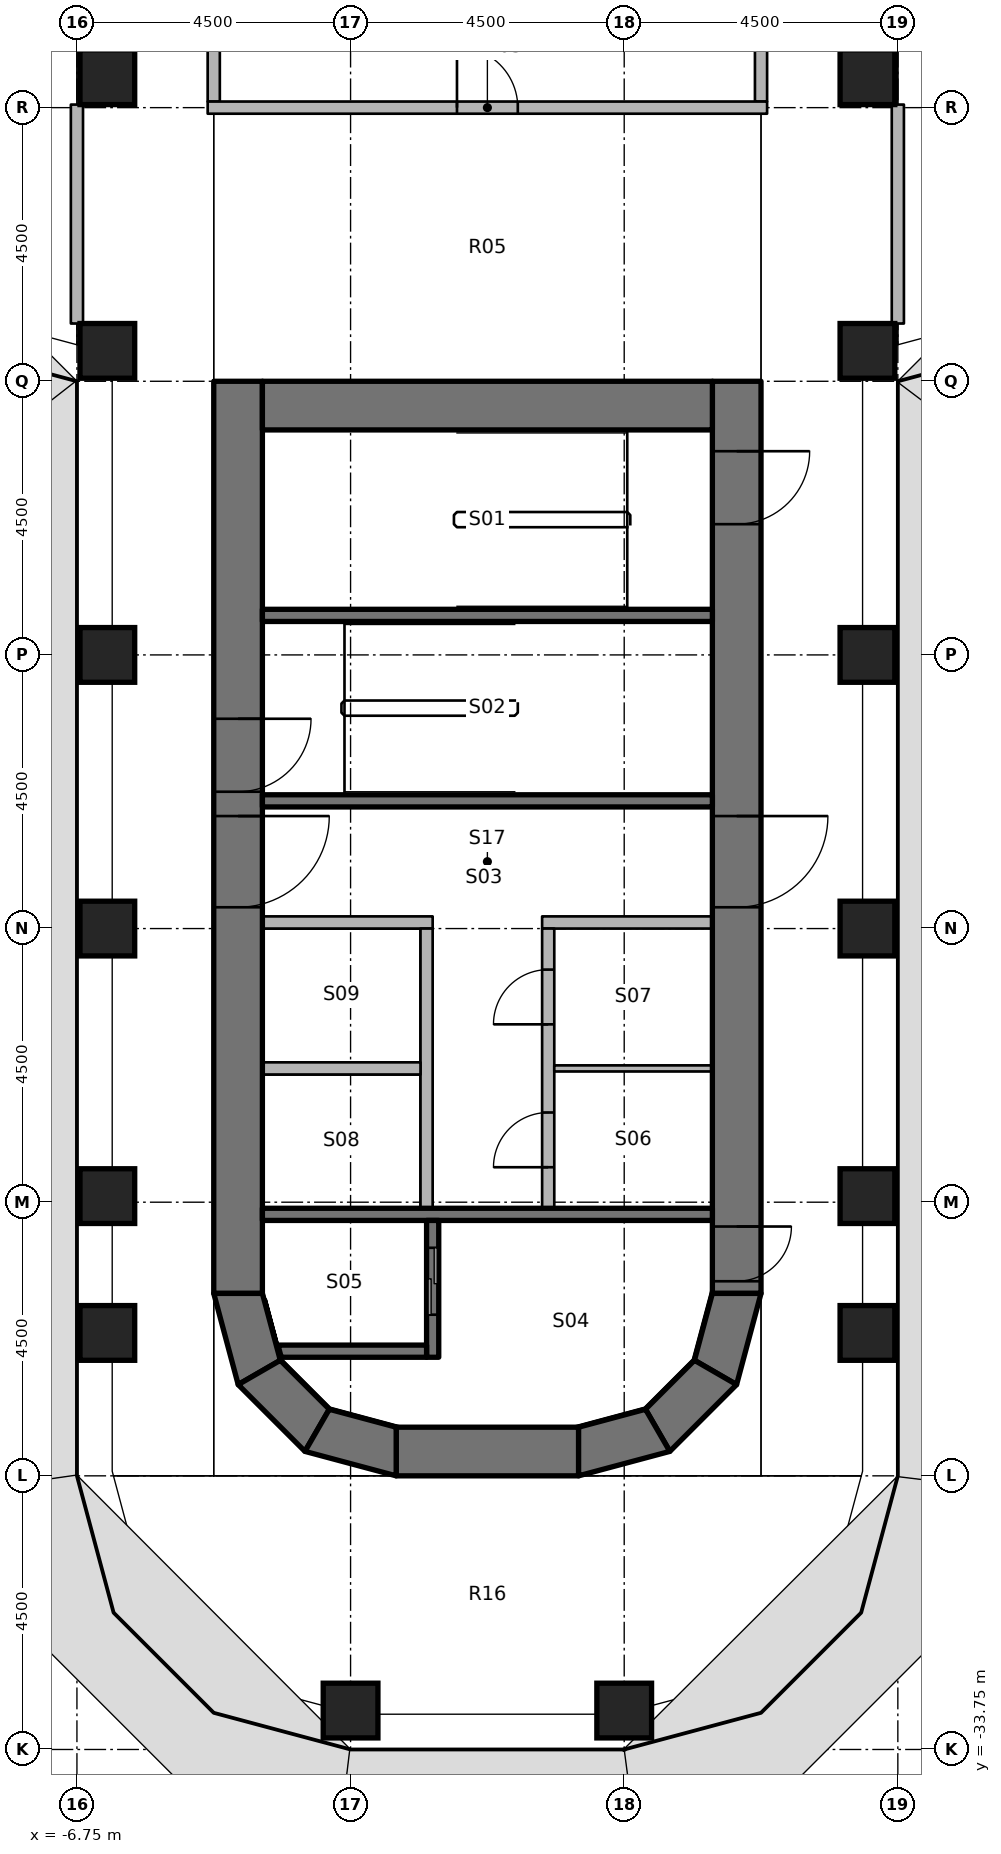
"""IFC4 building model, lengths in metres.
Left out: names, types, materials, properties, quantities, classifications, styles, units other than length and angle.
Written with IfcOpenShell. Run it as: python <this file> out.ifc"""

import sys

from ifc_helpers import new_model, si_unit, direction, frame, frame_2d, origin, origin_2d, place, context, subcontext, project, spatial, polyline, rectangle, outline, extrude, element, fill, save


model = new_model("IFC4")
c1 = context("Model", 3, precision=1e-05, world=origin(), true_north=direction((0.0, 1.0)))
c2 = subcontext(c1, "Body", "Model", "MODEL_VIEW")
j1 = project(units=[si_unit("LENGTHUNIT", "METRE"), si_unit("PLANEANGLEUNIT", "RADIAN")], contexts=[c1])
p1 = place(None, origin())
s1 = spatial("IfcSite", under=j1, at=p1, CompositionType="ELEMENT")
p2 = place(p1, origin())
s2 = spatial("IfcBuilding", under=s1, at=p2, CompositionType="ELEMENT")
p3 = place(p2, frame((0.0, 0.0, 124.6)))
s3 = spatial("IfcBuildingStorey", under=s2, at=p3, CompositionType="ELEMENT", Elevation=124.6)
for number, where, z_axis, x_axis in (
    (1, (-6.25, -26.9, 0.0), (0.0, 0.0, 1.0), (1.0, 0.0, 0.0)),
    (2, (-6.25, -24.65, 0.0), (0.0, 0.0, 1.0), (1.0, 0.0, 0.0)),
    (3, (-6.25, -20.25, 0.0), (0.0, 0.0, 1.0), (1.0, 0.0, 0.0)),
    (4, (-6.25, -15.75, 0.0), (0.0, 0.0, 1.0), (1.0, 0.0, 0.0)),
    (5, (-6.25, -10.75, 0.0), (0.0, 0.0, 1.0), (1.0, 0.0, 0.0)),
    (6, (-6.25, -6.25, 0.0), (0.0, 0.0, 1.0), (1.0, 0.0, 0.0)),
    (7, (-2.25, -33.11, 0.0), (0.0, 0.0, 1.0), (1.0, 0.0, 0.0)),
    (8, (2.25, -33.11, 0.0), (0.0, 0.0, 1.0), (1.0, 0.0, 0.0)),
    (9, (6.25, -26.9, 0.0), (0.0, 0.0, 1.0), (1.0, 0.0, 0.0)),
    (10, (6.25, -24.65, 0.0), (0.0, 0.0, 1.0), (1.0, 0.0, 0.0)),
    (11, (6.25, -20.25, 0.0), (0.0, 0.0, 1.0), (1.0, 0.0, 0.0)),
    (12, (6.25, -15.75, 0.0), (0.0, 0.0, 1.0), (1.0, 0.0, 0.0)),
    (13, (6.25, -10.75, 0.0), (0.0, 0.0, 1.0), (1.0, 0.0, 0.0)),
    (14, (6.25, -6.25, 0.0), (0.0, 0.0, 1.0), (1.0, 0.0, 0.0)),
):
    element("IfcColumn", number, at=place(p3, frame(where, z_axis=z_axis, x_axis=x_axis)), inside=s3, PredefinedType="COLUMN", context=c2, shape_type="SweptSolid", body=[
        extrude(rectangle(XDim=0.9, YDim=0.9, at=origin_2d()), origin(), (0.0, 0.0, 1.0), 3.65),
    ])
p4 = place(p3, frame((-4.1, -11.25, 0.0), z_axis=(0.0, 0.0, 1.0), x_axis=(0.0, -1.0, 0.0)))
e15 = element("IfcWall", 15, at=p4, inside=s3, PredefinedType="SHEAR", context=c2, shape_type="SweptSolid", body=[
    extrude(rectangle(XDim=15.0, YDim=0.8, at=frame_2d((7.5, 0.0))), origin(), (0.0, 0.0, 1.0), 3.8),
])
p5 = place(p4, frame((7.15, 0.0, 0.0)))
e16 = element("IfcOpeningElement", 16, at=p5, cuts=e15, PredefinedType="OPENING", context=c2, shape_type="SweptSolid", body=[
    extrude(rectangle(XDim=1.5, YDim=2.3, at=frame_2d((0.75, 1.15))), frame((0.0, 0.41, 0.0), z_axis=(0.0, -1.0, 0.0), x_axis=(1.0, 0.0, 0.0)), (0.0, 0.0, 1.0), 0.82),
])
p6 = place(p4, frame((5.55, 0.0, 0.0)))
e17 = element("IfcOpeningElement", 17, at=p6, cuts=e15, PredefinedType="OPENING", context=c2, shape_type="SweptSolid", body=[
    extrude(rectangle(XDim=1.2, YDim=2.1, at=frame_2d((0.6, 1.05))), frame((0.0, 0.41, 0.0), z_axis=(0.0, -1.0, 0.0), x_axis=(1.0, 0.0, 0.0)), (0.0, 0.0, 1.0), 0.82),
])
p7 = place(p3, frame((4.1, -11.25, 0.0), z_axis=(0.0, 0.0, 1.0), x_axis=(0.0, -1.0, 0.0)))
e18 = element("IfcWall", 18, at=p7, inside=s3, PredefinedType="SHEAR", context=c2, shape_type="SweptSolid", body=[
    extrude(rectangle(XDim=15.0, YDim=0.8, at=frame_2d((7.5, 0.0))), origin(), (0.0, 0.0, 1.0), 3.8),
])
p8 = place(p7, frame((7.15, 0.0, 0.0)))
e19 = element("IfcOpeningElement", 19, at=p8, cuts=e18, PredefinedType="OPENING", context=c2, shape_type="SweptSolid", body=[
    extrude(rectangle(XDim=1.5, YDim=2.3, at=frame_2d((0.75, 1.15))), frame((0.0, 0.41, 0.0), z_axis=(0.0, -1.0, 0.0), x_axis=(1.0, 0.0, 0.0)), (0.0, 0.0, 1.0), 0.82),
])
p9 = place(p7, frame((13.9, 0.0, 0.0)))
e20 = element("IfcOpeningElement", 20, at=p9, cuts=e18, PredefinedType="OPENING", context=c2, shape_type="SweptSolid", body=[
    extrude(rectangle(XDim=0.9, YDim=2.1, at=frame_2d((0.45, 1.05))), frame((0.0, 0.41, 0.0), z_axis=(0.0, -1.0, 0.0), x_axis=(1.0, 0.0, 0.0)), (0.0, 0.0, 1.0), 0.82),
])
p10 = place(p7, frame((1.15, 0.0, 0.0)))
e21 = element("IfcOpeningElement", 21, at=p10, cuts=e18, PredefinedType="OPENING", context=c2, shape_type="SweptSolid", body=[
    extrude(rectangle(XDim=1.2, YDim=2.1, at=frame_2d((0.6, 1.05))), frame((0.0, 0.41, 0.0), z_axis=(0.0, -1.0, 0.0), x_axis=(1.0, 0.0, 0.0)), (0.0, 0.0, 1.0), 0.82),
])
p11 = place(p3, frame((-3.7, -11.65, 0.0), z_axis=(0.0, 0.0, 1.0), x_axis=(1.0, 0.0, 0.0)))
e22 = element("IfcWall", 22, at=p11, inside=s3, PredefinedType="SHEAR", context=c2, shape_type="SweptSolid", body=[
    extrude(rectangle(XDim=7.4, YDim=0.8, at=frame_2d((3.7, 0.0))), origin(), (0.0, 0.0, 1.0), 3.8),
])
p12 = place(p3, frame((-1.5, -28.85, 0.0), z_axis=(0.0, 0.0, 1.0), x_axis=(1.0, 0.0, 0.0)))
e23 = element("IfcWall", 23, at=p12, inside=s3, PredefinedType="SHEAR", context=c2, shape_type="SweptSolid", body=[
    extrude(rectangle(XDim=3.0, YDim=0.8, at=frame_2d((1.5, 0.0))), origin(), (0.0, 0.0, 1.0), 3.8),
])
p13 = place(p3, origin())
e24 = element("IfcWall", 24, at=p13, inside=s3, PredefinedType="SHEAR", context=c2, shape_type="SweptSolid", body=[
    extrude(outline(polyline([(-4.5, -26.25), (-4.098, -27.75), (-3.405, -27.35), (-3.7, -26.25), (-4.5, -26.25)])), origin(), (0.0, 0.0, 1.0), 3.8),
])
p14 = place(p3, origin())
e25 = element("IfcWall", 25, at=p14, inside=s3, PredefinedType="SHEAR", context=c2, shape_type="SweptSolid", body=[
    extrude(outline(polyline([(-4.098, -27.75), (-3.0, -28.848), (-2.6, -28.155), (-3.405, -27.35), (-4.098, -27.75)])), origin(), (0.0, 0.0, 1.0), 3.8),
])
p15 = place(p3, origin())
e26 = element("IfcWall", 26, at=p15, inside=s3, PredefinedType="SHEAR", context=c2, shape_type="SweptSolid", body=[
    extrude(outline(polyline([(-3.0, -28.848), (-1.5, -29.25), (-1.5, -28.45), (-2.6, -28.155), (-3.0, -28.848)])), origin(), (0.0, 0.0, 1.0), 3.8),
])
p16 = place(p3, origin())
e27 = element("IfcWall", 27, at=p16, inside=s3, PredefinedType="SHEAR", context=c2, shape_type="SweptSolid", body=[
    extrude(outline(polyline([(4.5, -26.25), (4.098, -27.75), (3.405, -27.35), (3.7, -26.25), (4.5, -26.25)])), origin(), (0.0, 0.0, 1.0), 3.8),
])
p17 = place(p3, origin())
e28 = element("IfcWall", 28, at=p17, inside=s3, PredefinedType="SHEAR", context=c2, shape_type="SweptSolid", body=[
    extrude(outline(polyline([(4.098, -27.75), (3.0, -28.848), (2.6, -28.155), (3.405, -27.35), (4.098, -27.75)])), origin(), (0.0, 0.0, 1.0), 3.8),
])
p18 = place(p3, origin())
e29 = element("IfcWall", 29, at=p18, inside=s3, PredefinedType="SHEAR", context=c2, shape_type="SweptSolid", body=[
    extrude(outline(polyline([(3.0, -28.848), (1.5, -29.25), (1.5, -28.45), (2.6, -28.155), (3.0, -28.848)])), origin(), (0.0, 0.0, 1.0), 3.8),
])
p19 = place(p3, frame((3.7, -24.95, 0.0), z_axis=(0.0, 0.0, 1.0), x_axis=(-1.0, 0.0, 0.0)))
e30 = element("IfcWall", 30, at=p19, inside=s3, PredefinedType="SHEAR", context=c2, shape_type="SweptSolid", body=[
    extrude(rectangle(XDim=7.4, YDim=0.2, at=frame_2d((3.7, 0.0))), origin(), (0.0, 0.0, 1.0), 3.65),
])
p20 = place(p3, frame((-0.9, -27.3, 0.0), z_axis=(0.0, 0.0, 1.0), x_axis=(0.0, 1.0, 0.0)))
e31 = element("IfcWall", 31, at=p20, inside=s3, PredefinedType="SHEAR", context=c2, shape_type="SweptSolid", body=[
    extrude(rectangle(XDim=2.25, YDim=0.2, at=frame_2d((1.125, 0.0))), origin(), (0.0, 0.0, 1.0), 3.65),
])
p21 = place(p20, frame((0.7, 0.0, 0.0)))
e32 = element("IfcOpeningElement", 32, at=p21, cuts=e31, PredefinedType="OPENING", context=c2, shape_type="SweptSolid", body=[
    extrude(rectangle(XDim=1.1, YDim=2.3, at=frame_2d((0.55, 1.15))), frame((0.0, 0.11, 0.0), z_axis=(0.0, -1.0, 0.0), x_axis=(1.0, 0.0, 0.0)), (0.0, 0.0, 1.0), 0.22),
])
p22 = place(p3, origin())
e33 = element("IfcWall", 33, at=p22, inside=s3, PredefinedType="SHEAR", context=c2, shape_type="SweptSolid", body=[
    extrude(outline(polyline([(-1.0, -27.1), (-3.444, -27.1), (-3.39, -27.3), (-1.0, -27.3), (-1.0, -27.1)])), origin(), (0.0, 0.0, 1.0), 3.65),
])
for number, where, z_axis, x_axis in (
    (34, (3.7, -18.15, 0.0), (0.0, 0.0, 1.0), (-1.0, 0.0, 0.0)),
    (35, (3.7, -15.1, 0.0), (0.0, 0.0, 1.0), (-1.0, 0.0, 0.0)),
):
    element("IfcWall", number, at=place(p3, frame(where, z_axis=z_axis, x_axis=x_axis)), inside=s3, PredefinedType="SHEAR", context=c2, shape_type="SweptSolid", body=[
        extrude(rectangle(XDim=7.4, YDim=0.2, at=frame_2d((3.7, 0.0))), origin(), (0.0, 0.0, 1.0), 3.65),
    ])
p23 = place(p3, frame((3.7, -20.15, 0.0), z_axis=(0.0, 0.0, 1.0), x_axis=(-1.0, 0.0, 0.0)))
e36 = element("IfcWall", 36, at=p23, inside=s3, PredefinedType="PARTITIONING", context=c2, shape_type="SweptSolid", body=[
    extrude(rectangle(XDim=2.8, YDim=0.2, at=frame_2d((1.4, 0.0))), origin(), (0.0, 0.0, 1.0), 3.65),
])
p24 = place(p3, frame((1.0, -24.85, 0.0), z_axis=(0.0, 0.0, 1.0), x_axis=(0.0, 1.0, 0.0)))
e37 = element("IfcWall", 37, at=p24, inside=s3, PredefinedType="PARTITIONING", context=c2, shape_type="SweptSolid", body=[
    extrude(rectangle(XDim=4.6, YDim=0.2, at=frame_2d((2.3, 0.0))), origin(), (0.0, 0.0, 1.0), 3.65),
])
p25 = place(p24, frame((0.675, 0.0, 0.0)))
e38 = element("IfcOpeningElement", 38, at=p25, cuts=e37, PredefinedType="OPENING", context=c2, shape_type="SweptSolid", body=[
    extrude(rectangle(XDim=0.9, YDim=2.1, at=frame_2d((0.45, 1.05))), frame((0.0, 0.11, 0.0), z_axis=(0.0, -1.0, 0.0), x_axis=(1.0, 0.0, 0.0)), (0.0, 0.0, 1.0), 0.22),
])
p26 = place(p24, frame((3.025, 0.0, 0.0)))
e39 = element("IfcOpeningElement", 39, at=p26, cuts=e37, PredefinedType="OPENING", context=c2, shape_type="SweptSolid", body=[
    extrude(rectangle(XDim=0.9, YDim=2.1, at=frame_2d((0.45, 1.05))), frame((0.0, 0.11, 0.0), z_axis=(0.0, -1.0, 0.0), x_axis=(1.0, 0.0, 0.0)), (0.0, 0.0, 1.0), 0.22),
])
p27 = place(p3, frame((-0.9, -20.15, 0.0), z_axis=(0.0, 0.0, 1.0), x_axis=(-1.0, 0.0, 0.0)))
e40 = element("IfcWall", 40, at=p27, inside=s3, PredefinedType="PARTITIONING", context=c2, shape_type="SweptSolid", body=[
    extrude(rectangle(XDim=2.8, YDim=0.2, at=frame_2d((1.4, 0.0))), origin(), (0.0, 0.0, 1.0), 3.65),
])
p28 = place(p3, frame((-1.0, -24.85, 0.0), z_axis=(0.0, 0.0, 1.0), x_axis=(0.0, 1.0, 0.0)))
e41 = element("IfcWall", 41, at=p28, inside=s3, PredefinedType="PARTITIONING", context=c2, shape_type="SweptSolid", body=[
    extrude(rectangle(XDim=4.6, YDim=0.2, at=frame_2d((2.3, 0.0))), origin(), (0.0, 0.0, 1.0), 3.65),
])
p29 = place(p3, frame((3.7, -22.55, 0.0), z_axis=(0.0, 0.0, 1.0), x_axis=(-1.0, 0.0, 0.0)))
e42 = element("IfcWall", 42, at=p29, inside=s3, PredefinedType="PARTITIONING", context=c2, shape_type="SweptSolid", body=[
    extrude(rectangle(XDim=2.6, YDim=0.1, at=frame_2d((1.3, 0.0))), origin(), (0.0, 0.0, 1.0), 3.65),
])
p30 = place(p3, frame((-1.1, -22.55, 0.0), z_axis=(0.0, 0.0, 1.0), x_axis=(-1.0, 0.0, 0.0)))
e43 = element("IfcWall", 43, at=p30, inside=s3, PredefinedType="PARTITIONING", context=c2, shape_type="SweptSolid", body=[
    extrude(rectangle(XDim=2.6, YDim=0.2, at=frame_2d((1.3, 0.0))), origin(), (0.0, 0.0, 1.0), 3.65),
])
p31 = place(p3, frame((-4.5, -6.65, 0.0), z_axis=(0.0, 0.0, 1.0), x_axis=(0.0, 1.0, 0.0)))
e44 = element("IfcWall", 44, at=p31, inside=s3, PredefinedType="PARTITIONING", context=c2, shape_type="SweptSolid", body=[
    extrude(rectangle(XDim=4.3, YDim=0.2, at=frame_2d((2.15, 0.0))), origin(), (0.0, 0.0, 1.0), 2.738),
])
p32 = place(p3, frame((-6.75, -10.3, 0.0), z_axis=(0.0, 0.0, 1.0), x_axis=(0.0, 1.0, 0.0)))
e45 = element("IfcWall", 45, at=p32, inside=s3, PredefinedType="PARTITIONING", context=c2, shape_type="SweptSolid", body=[
    extrude(rectangle(XDim=3.6, YDim=0.2, at=frame_2d((1.8, 0.0))), origin(), (0.0, 0.0, 1.0), 2.738),
])
p33 = place(p3, frame((4.5, -6.65, 0.0), z_axis=(0.0, 0.0, 1.0), x_axis=(0.0, 1.0, 0.0)))
e46 = element("IfcWall", 46, at=p33, inside=s3, PredefinedType="PARTITIONING", context=c2, shape_type="SweptSolid", body=[
    extrude(rectangle(XDim=4.3, YDim=0.2, at=frame_2d((2.15, 0.0))), origin(), (0.0, 0.0, 1.0), 2.738),
])
p34 = place(p3, frame((6.75, -10.3, 0.0), z_axis=(0.0, 0.0, 1.0), x_axis=(0.0, 1.0, 0.0)))
e47 = element("IfcWall", 47, at=p34, inside=s3, PredefinedType="PARTITIONING", context=c2, shape_type="SweptSolid", body=[
    extrude(rectangle(XDim=3.6, YDim=0.2, at=frame_2d((1.8, 0.0))), origin(), (0.0, 0.0, 1.0), 2.738),
])
p35 = place(p3, frame((-4.6, -6.75, 0.0), z_axis=(0.0, 0.0, 1.0), x_axis=(1.0, 0.0, 0.0)))
e48 = element("IfcWall", 48, at=p35, inside=s3, PredefinedType="PARTITIONING", context=c2, shape_type="SweptSolid", body=[
    extrude(rectangle(XDim=9.2, YDim=0.2, at=frame_2d((4.6, 0.0))), origin(), (0.0, 0.0, 1.0), 2.738),
])
p36 = place(p35, frame((4.1, 0.0, 0.0)))
e49 = element("IfcOpeningElement", 49, at=p36, cuts=e48, PredefinedType="OPENING", context=c2, shape_type="SweptSolid", body=[
    extrude(rectangle(XDim=1.0, YDim=2.1, at=frame_2d((0.5, 1.05))), frame((0.0, 0.11, 0.0), z_axis=(0.0, -1.0, 0.0), x_axis=(1.0, 0.0, 0.0)), (0.0, 0.0, 1.0), 0.22),
])
p37 = place(p8, origin())
e50 = element("IfcDoor", 50, at=p37, inside=s3, OperationType="DOUBLE_DOOR_SINGLE_SWING", PredefinedType="DOOR", context=c2, shape_type="SweptSolid", body=[
    extrude(rectangle(XDim=1.5, YDim=2.3, at=frame_2d((0.75, 1.15))), frame((0.0, 0.025, 0.0), z_axis=(0.0, -1.0, 0.0), x_axis=(1.0, 0.0, 0.0)), (0.0, 0.0, 1.0), 0.05),
])
fill(e19, e50)
p38 = place(p5, origin())
e51 = element("IfcDoor", 51, at=p38, inside=s3, OperationType="DOUBLE_DOOR_SINGLE_SWING", PredefinedType="DOOR", context=c2, shape_type="SweptSolid", body=[
    extrude(rectangle(XDim=1.5, YDim=2.3, at=frame_2d((0.75, 1.15))), frame((0.0, 0.025, 0.0), z_axis=(0.0, -1.0, 0.0), x_axis=(1.0, 0.0, 0.0)), (0.0, 0.0, 1.0), 0.05),
])
fill(e16, e51)
p39 = place(p9, origin())
e52 = element("IfcDoor", 52, at=p39, inside=s3, OperationType="SINGLE_SWING_LEFT", PredefinedType="DOOR", context=c2, shape_type="SweptSolid", body=[
    extrude(rectangle(XDim=0.9, YDim=2.1, at=frame_2d((0.45, 1.05))), frame((0.0, 0.025, 0.0), z_axis=(0.0, -1.0, 0.0), x_axis=(1.0, 0.0, 0.0)), (0.0, 0.0, 1.0), 0.05),
])
fill(e20, e52)
p40 = place(p6, origin())
e53 = element("IfcDoor", 53, at=p40, inside=s3, OperationType="SINGLE_SWING_LEFT", PredefinedType="DOOR", context=c2, shape_type="SweptSolid", body=[
    extrude(rectangle(XDim=1.2, YDim=2.1, at=frame_2d((0.6, 1.05))), frame((0.0, 0.025, 0.0), z_axis=(0.0, -1.0, 0.0), x_axis=(1.0, 0.0, 0.0)), (0.0, 0.0, 1.0), 0.05),
])
fill(e17, e53)
p41 = place(p10, origin())
e54 = element("IfcDoor", 54, at=p41, inside=s3, OperationType="SINGLE_SWING_LEFT", PredefinedType="DOOR", context=c2, shape_type="SweptSolid", body=[
    extrude(rectangle(XDim=1.2, YDim=2.1, at=frame_2d((0.6, 1.05))), frame((0.0, 0.025, 0.0), z_axis=(0.0, -1.0, 0.0), x_axis=(1.0, 0.0, 0.0)), (0.0, 0.0, 1.0), 0.05),
])
fill(e21, e54)
p42 = place(p21, origin())
e55 = element("IfcDoor", 55, at=p42, inside=s3, OperationType="DOUBLE_DOOR_SLIDING", PredefinedType="DOOR", context=c2, shape_type="SweptSolid", body=[
    extrude(rectangle(XDim=1.1, YDim=2.3, at=frame_2d((0.55, 1.15))), frame((0.0, 0.025, 0.0), z_axis=(0.0, -1.0, 0.0), x_axis=(1.0, 0.0, 0.0)), (0.0, 0.0, 1.0), 0.05),
])
fill(e32, e55)
p43 = place(p25, origin())
e56 = element("IfcDoor", 56, at=p43, inside=s3, OperationType="SINGLE_SWING_LEFT", PredefinedType="DOOR", context=c2, shape_type="SweptSolid", body=[
    extrude(rectangle(XDim=0.9, YDim=2.1, at=frame_2d((0.45, 1.05))), frame((0.0, 0.025, 0.0), z_axis=(0.0, -1.0, 0.0), x_axis=(1.0, 0.0, 0.0)), (0.0, 0.0, 1.0), 0.05),
])
fill(e38, e56)
p44 = place(p26, origin())
e57 = element("IfcDoor", 57, at=p44, inside=s3, OperationType="SINGLE_SWING_LEFT", PredefinedType="DOOR", context=c2, shape_type="SweptSolid", body=[
    extrude(rectangle(XDim=0.9, YDim=2.1, at=frame_2d((0.45, 1.05))), frame((0.0, 0.025, 0.0), z_axis=(0.0, -1.0, 0.0), x_axis=(1.0, 0.0, 0.0)), (0.0, 0.0, 1.0), 0.05),
])
fill(e39, e57)
p45 = place(p36, origin())
e58 = element("IfcDoor", 58, at=p45, inside=s3, OperationType="SINGLE_SWING_RIGHT", PredefinedType="DOOR", context=c2, shape_type="SweptSolid", body=[
    extrude(rectangle(XDim=1.0, YDim=2.1, at=frame_2d((0.5, 1.05))), frame((0.0, 0.025, 0.0), z_axis=(0.0, -1.0, 0.0), x_axis=(1.0, 0.0, 0.0)), (0.0, 0.0, 1.0), 0.05),
])
fill(e49, e58)
save(model, sys.argv[1])
